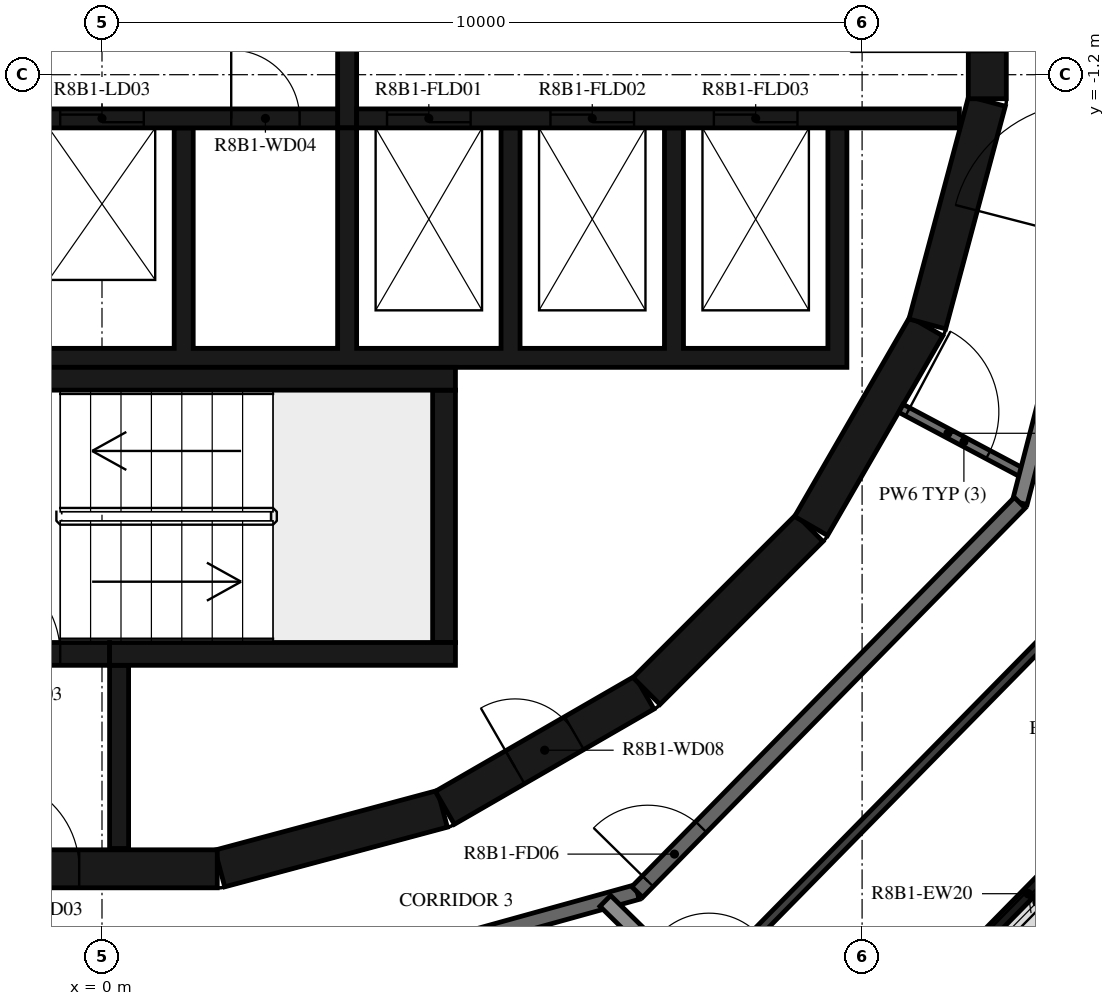
"""IFC4 building model, lengths in metres.
Left out: names, types, materials, properties, quantities, classifications, styles, units other than length and angle.
Written with IfcOpenShell. Run it as: python <this file> out.ifc"""

import sys

from ifc_helpers import new_model, si_unit, direction, frame, frame_2d, origin, place, context, subcontext, project, spatial, polyline, rectangle, outline, extrude, element, fill, save


model = new_model("IFC4")
c1 = context("Model", 3, precision=1e-05, world=origin(), true_north=direction((0.0, 1.0)))
c2 = subcontext(c1, "Body", "Model", "MODEL_VIEW")
j1 = project(units=[si_unit("LENGTHUNIT", "METRE"), si_unit("PLANEANGLEUNIT", "RADIAN")], contexts=[c1])
p1 = place(None, origin())
s1 = spatial("IfcSite", under=j1, at=p1, CompositionType="ELEMENT")
p2 = place(p1, origin())
s2 = spatial("IfcBuilding", under=s1, at=p2, CompositionType="ELEMENT")
p3 = place(p2, frame((0.0, 0.0, 308.7)))
s3 = spatial("IfcBuildingStorey", under=s2, at=p3, CompositionType="ELEMENT", Elevation=308.7)
p4 = place(p3, frame((11.064, -13.116, 0.0), z_axis=(0.0, 0.0, 1.0), x_axis=(0.700900076932, 0.713259477439, 0.0)))
e1 = element("IfcWall", 1, at=p4, inside=s3, PredefinedType="STANDARD", context=c2, shape_type="SweptSolid", body=[
    extrude(rectangle(XDim=3.2, YDim=0.16, at=frame_2d((1.6, 0.0))), origin(), (0.0, 0.0, 1.0), 3.12),
])
p5 = place(p4, frame((0.4, 0.0, 0.0)))
e2 = element("IfcOpeningElement", 2, at=p5, cuts=e1, PredefinedType="OPENING", context=c2, shape_type="SweptSolid", body=[
    extrude(rectangle(XDim=2.4, YDim=2.4, at=frame_2d((1.2, 1.2))), frame((0.0, 0.09, 0.0), z_axis=(0.0, -1.0, 0.0), x_axis=(1.0, 0.0, 0.0)), (0.0, 0.0, 1.0), 0.18),
])
p6 = place(p3, frame((1.55, -11.643, 0.0), z_axis=(0.0, 0.0, 1.0), x_axis=(0.965948410781, 0.258734743916, 0.0)))
e3 = element("IfcWall", 3, at=p6, inside=s3, PredefinedType="SHEAR", context=c2, shape_type="SweptSolid", body=[
    extrude(rectangle(XDim=3.033, YDim=0.5, at=frame_2d((1.516, 0.0))), origin(), (0.0, 0.0, 1.0), 3.12),
])
p7 = place(p3, frame((4.51, -10.845, 0.0), z_axis=(0.0, 0.0, 1.0), x_axis=(0.865975092491, 0.500087131594, 0.0)))
e4 = element("IfcWall", 4, at=p7, inside=s3, PredefinedType="SHEAR", context=c2, shape_type="SweptSolid", body=[
    extrude(rectangle(XDim=3.033, YDim=0.5, at=frame_2d((1.516, 0.0))), origin(), (0.0, 0.0, 1.0), 3.12),
])
p8 = place(p7, frame((1.066, 0.0, 0.0)))
e5 = element("IfcOpeningElement", 5, at=p8, cuts=e4, PredefinedType="OPENING", context=c2, shape_type="SweptSolid", body=[
    extrude(rectangle(XDim=0.9, YDim=2.1, at=frame_2d((0.45, 1.05))), frame((0.0, 0.26, 0.0), z_axis=(0.0, -1.0, 0.0), x_axis=(1.0, 0.0, 0.0)), (0.0, 0.0, 1.0), 0.52),
])
p9 = place(p3, frame((7.164, -9.308, 0.0), z_axis=(0.0, 0.0, 1.0), x_axis=(0.707106781187, 0.707106781187, 0.0)))
e6 = element("IfcWall", 6, at=p9, inside=s3, PredefinedType="SHEAR", context=c2, shape_type="SweptSolid", body=[
    extrude(rectangle(XDim=3.032, YDim=0.5, at=frame_2d((1.516, 0.0))), origin(), (0.0, 0.0, 1.0), 3.12),
])
for number, where, z_axis, x_axis in (
    (7, (9.329, -7.137, 0.0), (0.0, 0.0, 1.0), (0.5, 0.866, 0.0)),
    (8, (10.858, -4.479, 0.0), (0.0, 0.0, 1.0), (0.259, 0.966, 0.0)),
):
    element("IfcWall", number, at=place(p3, frame(where, z_axis=z_axis, x_axis=x_axis)), inside=s3, PredefinedType="SHEAR", context=c2, shape_type="SweptSolid", body=[
        extrude(rectangle(XDim=3.033, YDim=0.5, at=frame_2d((1.516, 0.0))), origin(), (0.0, 0.0, 1.0), 3.12),
    ])
p10 = place(p3, frame((11.647, -1.516, 0.0), z_axis=(0.0, 0.0, 1.0), x_axis=(0.0, 1.0, 0.0)))
e9 = element("IfcWall", 9, at=p10, inside=s3, PredefinedType="SHEAR", context=c2, shape_type="SweptSolid", body=[
    extrude(rectangle(XDim=3.033, YDim=0.5, at=frame_2d((1.516, 0.0))), origin(), (0.0, 0.0, 1.0), 3.12),
])
p11 = place(p10, frame((0.616, 0.0, 0.0)))
e10 = element("IfcOpeningElement", 10, at=p11, cuts=e9, PredefinedType="OPENING", context=c2, shape_type="SweptSolid", body=[
    extrude(rectangle(XDim=1.8, YDim=2.1, at=frame_2d((0.9, 1.05))), frame((0.0, 0.26, 0.0), z_axis=(0.0, -1.0, 0.0), x_axis=(1.0, 0.0, 0.0)), (0.0, 0.0, 1.0), 0.52),
])
p12 = place(p3, frame((-1.516, -11.647, 0.0), z_axis=(0.0, 0.0, 1.0), x_axis=(1.0, 0.0, 0.0)))
e11 = element("IfcWall", 11, at=p12, inside=s3, PredefinedType="SHEAR", context=c2, shape_type="SweptSolid", body=[
    extrude(rectangle(XDim=3.033, YDim=0.5, at=frame_2d((1.516, 0.0))), origin(), (0.0, 0.0, 1.0), 3.12),
])
p13 = place(p12, frame((0.016, 0.0, 0.0)))
e12 = element("IfcOpeningElement", 12, at=p13, cuts=e11, PredefinedType="OPENING", context=c2, shape_type="SweptSolid", body=[
    extrude(rectangle(XDim=1.2, YDim=2.1, at=frame_2d((0.6, 1.05))), frame((0.0, 0.26, 0.0), z_axis=(0.0, -1.0, 0.0), x_axis=(1.0, 0.0, 0.0)), (0.0, 0.0, 1.0), 0.52),
])
p14 = place(p3, frame((-2.4, -5.2, 0.0), z_axis=(0.0, 0.0, 1.0), x_axis=(1.0, 0.0, 0.0)))
e13 = element("IfcWall", 13, at=p14, inside=s3, PredefinedType="SHEAR", context=c2, shape_type="SweptSolid", body=[
    extrude(rectangle(XDim=7.05, YDim=0.3, at=frame_2d((3.525, 0.0))), origin(), (0.0, 0.0, 1.0), 3.12),
])
p15 = place(p3, frame((4.5, -8.67, 0.0), z_axis=(0.0, 0.0, 1.0), x_axis=(0.0, 1.0, 0.0)))
e14 = element("IfcWall", 14, at=p15, inside=s3, PredefinedType="SHEAR", context=c2, shape_type="SweptSolid", body=[
    extrude(rectangle(XDim=3.32, YDim=0.3, at=frame_2d((1.66, 0.0))), origin(), (0.0, 0.0, 1.0), 3.12),
])
p16 = place(p3, frame((0.1, -8.82, 0.0), z_axis=(0.0, 0.0, 1.0), x_axis=(1.0, 0.0, 0.0)))
e15 = element("IfcWall", 15, at=p16, inside=s3, PredefinedType="SHEAR", context=c2, shape_type="SweptSolid", body=[
    extrude(rectangle(XDim=4.55, YDim=0.3, at=frame_2d((2.275, 0.0))), origin(), (0.0, 0.0, 1.0), 3.12),
])
p17 = place(p3, frame((-2.4, -8.82, 0.0), z_axis=(0.0, 0.0, 1.0), x_axis=(1.0, 0.0, 0.0)))
e16 = element("IfcWall", 16, at=p17, inside=s3, PredefinedType="SHEAR", context=c2, shape_type="SweptSolid", body=[
    extrude(rectangle(XDim=2.5, YDim=0.3, at=frame_2d((1.25, 0.0))), origin(), (0.0, 0.0, 1.0), 3.12),
])
p18 = place(p17, frame((0.65, 0.0, 0.0)))
e17 = element("IfcOpeningElement", 17, at=p18, cuts=e16, PredefinedType="OPENING", context=c2, shape_type="SweptSolid", body=[
    extrude(rectangle(XDim=1.2, YDim=2.1, at=frame_2d((0.6, 1.05))), frame((0.0, 0.16, 0.0), z_axis=(0.0, -1.0, 0.0), x_axis=(1.0, 0.0, 0.0)), (0.0, 0.0, 1.0), 0.32),
])
p19 = place(p3, frame((0.225, -8.97, 0.0), z_axis=(0.0, 0.0, 1.0), x_axis=(0.0, -1.0, 0.0)))
e18 = element("IfcWall", 18, at=p19, inside=s3, PredefinedType="SHEAR", context=c2, shape_type="SweptSolid", body=[
    extrude(rectangle(XDim=2.41, YDim=0.25, at=frame_2d((1.205, 0.0))), origin(), (0.0, 0.0, 1.0), 3.12),
])
p20 = place(p3, origin())
e19 = element("IfcWall", 19, at=p20, inside=s3, PredefinedType="SHEAR", context=c2, shape_type="SweptSolid", body=[
    extrude(outline(polyline([(9.8, -5.05), (9.8, -4.8), (9.8, -1.9), (9.55, -1.9), (9.55, -4.8), (7.65, -4.8), (7.65, -1.9), (7.4, -1.9), (7.4, -4.8), (5.5, -4.8), (5.5, -1.9), (5.25, -1.9), (5.25, -4.8), (3.35, -4.8), (3.35, -1.9), (3.1, -1.9), (3.1, -4.8), (1.2, -4.8), (1.2, -1.9), (0.95, -1.9), (0.95, -4.8), (-0.95, -4.8), (-0.95, -1.9), (-1.2, -1.9), (-1.2, -4.8), (-3.1, -4.8), (-3.1, -1.9), (-3.35, -1.9), (-3.35, -4.8), (-5.25, -4.8), (-5.25, -1.9), (-5.5, -1.9), (-5.5, -4.8), (-9.55, -4.8), (-9.55, -1.9), (-9.8, -1.9), (-9.8, -4.8), (-9.8, -5.05), (9.8, -5.05)])), origin(), (0.0, 0.0, 1.0), 3.12),
])
p21 = place(p3, frame((-11.28, -1.775, 0.0), z_axis=(0.0, 0.0, 1.0), x_axis=(1.0, 0.0, 0.0)))
e20 = element("IfcWall", 20, at=p21, inside=s3, PredefinedType="SHEAR", context=c2, shape_type="SweptSolid", body=[
    extrude(rectangle(XDim=14.38, YDim=0.25, at=frame_2d((7.19, 0.0))), origin(), (0.0, 0.0, 1.0), 3.12),
])
p22 = place(p21, frame((6.43, 0.0, 0.0)))
e21 = element("IfcOpeningElement", 21, at=p22, cuts=e20, PredefinedType="OPENING", context=c2, shape_type="SweptSolid", body=[
    extrude(rectangle(XDim=1.1, YDim=2.1, at=frame_2d((0.55, 1.05))), frame((0.0, 0.135, 0.0), z_axis=(0.0, -1.0, 0.0), x_axis=(1.0, 0.0, 0.0)), (0.0, 0.0, 1.0), 0.27),
])
p23 = place(p21, frame((8.58, 0.0, 0.0)))
e22 = element("IfcOpeningElement", 22, at=p23, cuts=e20, PredefinedType="OPENING", context=c2, shape_type="SweptSolid", body=[
    extrude(rectangle(XDim=1.1, YDim=2.1, at=frame_2d((0.55, 1.05))), frame((0.0, 0.135, 0.0), z_axis=(0.0, -1.0, 0.0), x_axis=(1.0, 0.0, 0.0)), (0.0, 0.0, 1.0), 0.27),
])
p24 = place(p21, frame((10.73, 0.0, 0.0)))
e23 = element("IfcOpeningElement", 23, at=p24, cuts=e20, PredefinedType="OPENING", context=c2, shape_type="SweptSolid", body=[
    extrude(rectangle(XDim=1.1, YDim=2.1, at=frame_2d((0.55, 1.05))), frame((0.0, 0.135, 0.0), z_axis=(0.0, -1.0, 0.0), x_axis=(1.0, 0.0, 0.0)), (0.0, 0.0, 1.0), 0.27),
])
p25 = place(p21, frame((3.305, 0.0, 0.0)))
e24 = element("IfcOpeningElement", 24, at=p25, cuts=e20, PredefinedType="OPENING", context=c2, shape_type="SweptSolid", body=[
    extrude(rectangle(XDim=0.9, YDim=2.1, at=frame_2d((0.45, 1.05))), frame((0.0, 0.135, 0.0), z_axis=(0.0, -1.0, 0.0), x_axis=(1.0, 0.0, 0.0)), (0.0, 0.0, 1.0), 0.27),
])
p26 = place(p21, frame((12.98, 0.0, 0.0)))
e25 = element("IfcOpeningElement", 25, at=p26, cuts=e20, PredefinedType="OPENING", context=c2, shape_type="SweptSolid", body=[
    extrude(rectangle(XDim=0.9, YDim=2.1, at=frame_2d((0.45, 1.05))), frame((0.0, 0.135, 0.0), z_axis=(0.0, -1.0, 0.0), x_axis=(1.0, 0.0, 0.0)), (0.0, 0.0, 1.0), 0.27),
])
p27 = place(p3, frame((3.35, -1.775, 0.0), z_axis=(0.0, 0.0, 1.0), x_axis=(1.0, 0.0, 0.0)))
e26 = element("IfcWall", 26, at=p27, inside=s3, PredefinedType="SHEAR", context=c2, shape_type="SweptSolid", body=[
    extrude(rectangle(XDim=7.93, YDim=0.25, at=frame_2d((3.965, 0.0))), origin(), (0.0, 0.0, 1.0), 3.12),
])
p28 = place(p27, frame((0.4, 0.0, 0.0)))
e27 = element("IfcOpeningElement", 27, at=p28, cuts=e26, PredefinedType="OPENING", context=c2, shape_type="SweptSolid", body=[
    extrude(rectangle(XDim=1.1, YDim=2.4, at=frame_2d((0.55, 1.2))), frame((0.0, 0.135, 0.0), z_axis=(0.0, -1.0, 0.0), x_axis=(1.0, 0.0, 0.0)), (0.0, 0.0, 1.0), 0.27),
])
p29 = place(p27, frame((2.55, 0.0, 0.0)))
e28 = element("IfcOpeningElement", 28, at=p29, cuts=e26, PredefinedType="OPENING", context=c2, shape_type="SweptSolid", body=[
    extrude(rectangle(XDim=1.1, YDim=2.4, at=frame_2d((0.55, 1.2))), frame((0.0, 0.135, 0.0), z_axis=(0.0, -1.0, 0.0), x_axis=(1.0, 0.0, 0.0)), (0.0, 0.0, 1.0), 0.27),
])
p30 = place(p27, frame((4.7, 0.0, 0.0)))
e29 = element("IfcOpeningElement", 29, at=p30, cuts=e26, PredefinedType="OPENING", context=c2, shape_type="SweptSolid", body=[
    extrude(rectangle(XDim=1.1, YDim=2.4, at=frame_2d((0.55, 1.2))), frame((0.0, 0.135, 0.0), z_axis=(0.0, -1.0, 0.0), x_axis=(1.0, 0.0, 0.0)), (0.0, 0.0, 1.0), 0.27),
])
p31 = place(p3, frame((3.225, -1.9, 0.0), z_axis=(0.0, 0.0, 1.0), x_axis=(0.0, 1.0, 0.0)))
e30 = element("IfcWall", 30, at=p31, inside=s3, PredefinedType="SHEAR", context=c2, shape_type="SweptSolid", body=[
    extrude(rectangle(XDim=3.8, YDim=0.25, at=frame_2d((1.9, 0.0))), origin(), (0.0, 0.0, 1.0), 3.12),
])
p32 = place(p3, frame((10.511, -5.589, 0.0), z_axis=(0.0, 0.0, 1.0), x_axis=(0.882957311919, -0.469453283437, 0.0)))
e31 = element("IfcWall", 31, at=p32, inside=s3, PredefinedType="PARTITIONING", context=c2, shape_type="SweptSolid", body=[
    extrude(rectangle(XDim=1.876, YDim=0.12, at=frame_2d((0.938, 0.0))), origin(), (0.0, 0.0, 1.0), 3.12),
])
p33 = place(p32, frame((0.1, 0.0, 0.0)))
e32 = element("IfcOpeningElement", 32, at=p33, cuts=e31, PredefinedType="OPENING", context=c2, shape_type="SweptSolid", body=[
    extrude(rectangle(XDim=1.2, YDim=2.1, at=frame_2d((0.6, 1.05))), frame((0.0, 0.07, 0.0), z_axis=(0.0, -1.0, 0.0), x_axis=(1.0, 0.0, 0.0)), (0.0, 0.0, 1.0), 0.14),
])
p34 = place(p3, frame((12.074, -6.831, 0.0), z_axis=(0.0, 0.0, 1.0), x_axis=(0.250391063186, 0.968144780225, 0.0)))
e33 = element("IfcWall", 33, at=p34, inside=s3, PredefinedType="STANDARD", context=c2, shape_type="SweptSolid", body=[
    extrude(rectangle(XDim=7.181, YDim=0.2, at=frame_2d((3.591, 0.0))), origin(), (0.0, 0.0, 1.0), 3.12),
])
p35 = place(p34, frame((3.581, 0.0, 0.0)))
e34 = element("IfcOpeningElement", 34, at=p35, cuts=e33, PredefinedType="OPENING", context=c2, shape_type="SweptSolid", body=[
    extrude(rectangle(XDim=1.8, YDim=2.1, at=frame_2d((0.9, 1.05))), frame((0.0, 0.11, 0.0), z_axis=(0.0, -1.0, 0.0), x_axis=(1.0, 0.0, 0.0)), (0.0, 0.0, 1.0), 0.22),
])
p36 = place(p3, frame((-6.831, -12.074, 0.0), z_axis=(0.0, 0.0, 1.0), x_axis=(0.968144780225, -0.250391063186, 0.0)))
e35 = element("IfcWall", 35, at=p36, inside=s3, PredefinedType="STANDARD", context=c2, shape_type="SweptSolid", body=[
    extrude(rectangle(XDim=7.181, YDim=0.2, at=frame_2d((3.591, 0.0))), origin(), (0.0, 0.0, 1.0), 3.12),
])
p37 = place(p36, frame((2.39, 0.0, 0.0)))
e36 = element("IfcOpeningElement", 36, at=p37, cuts=e35, PredefinedType="OPENING", context=c2, shape_type="SweptSolid", body=[
    extrude(rectangle(XDim=1.0, YDim=2.1, at=frame_2d((0.5, 1.05))), frame((0.0, 0.11, 0.0), z_axis=(0.0, -1.0, 0.0), x_axis=(1.0, 0.0, 0.0)), (0.0, 0.0, 1.0), 0.22),
])
p38 = place(p36, frame((5.69, 0.0, 0.0)))
e37 = element("IfcOpeningElement", 37, at=p38, cuts=e35, PredefinedType="OPENING", context=c2, shape_type="SweptSolid", body=[
    extrude(rectangle(XDim=1.0, YDim=2.1, at=frame_2d((0.5, 1.05))), frame((0.0, 0.11, 0.0), z_axis=(0.0, -1.0, 0.0), x_axis=(1.0, 0.0, 0.0)), (0.0, 0.0, 1.0), 0.22),
])
p39 = place(p3, frame((0.121, -13.872, 0.0), z_axis=(0.0, 0.0, 1.0), x_axis=(0.963625960674, 0.267254575108, 0.0)))
e38 = element("IfcWall", 38, at=p39, inside=s3, PredefinedType="STANDARD", context=c2, shape_type="SweptSolid", body=[
    extrude(rectangle(XDim=7.181, YDim=0.2, at=frame_2d((3.591, 0.0))), origin(), (0.0, 0.0, 1.0), 3.12),
])
p40 = place(p3, frame((7.041, -11.953, 0.0), z_axis=(0.0, 0.0, 1.0), x_axis=(0.70090916255, 0.713250549143, 0.0)))
e39 = element("IfcWall", 39, at=p40, inside=s3, PredefinedType="STANDARD", context=c2, shape_type="SweptSolid", body=[
    extrude(rectangle(XDim=7.181, YDim=0.2, at=frame_2d((3.59, 0.0))), origin(), (0.0, 0.0, 1.0), 3.12),
])
p41 = place(p40, frame((0.2, 0.0, 0.0)))
e40 = element("IfcOpeningElement", 40, at=p41, cuts=e39, PredefinedType="OPENING", context=c2, shape_type="SweptSolid", body=[
    extrude(rectangle(XDim=1.0, YDim=2.1, at=frame_2d((0.5, 1.05))), frame((0.0, 0.11, 0.0), z_axis=(0.0, -1.0, 0.0), x_axis=(1.0, 0.0, 0.0)), (0.0, 0.0, 1.0), 0.22),
])
p42 = place(p3, frame((9.462, -14.861, 0.0), z_axis=(0.0, 0.0, 1.0), x_axis=(-0.713302018318, 0.700856783276, 0.0)))
e41 = element("IfcWall", 41, at=p42, inside=s3, PredefinedType="STANDARD", context=c2, shape_type="SweptSolid", body=[
    extrude(rectangle(XDim=3.982, YDim=0.2, at=frame_2d((1.991, 0.0))), origin(), (0.0, 0.0, 1.0), 2.73),
])
p43 = place(p3, frame((7.846, -13.273, 0.0), z_axis=(0.0, 0.0, 1.0), x_axis=(0.700915117659, 0.713244697027, 0.0)))
e42 = element("IfcWall", 42, at=p43, inside=s3, PredefinedType="PARTITIONING", context=c2, shape_type="SweptSolid", body=[
    extrude(rectangle(XDim=7.96, YDim=0.12, at=frame_2d((3.98, 0.0))), origin(), (0.0, 0.0, 1.0), 3.12),
])
p44 = place(p43, frame((0.2, 0.0, 0.0)))
e43 = element("IfcOpeningElement", 43, at=p44, cuts=e42, PredefinedType="OPENING", context=c2, shape_type="SweptSolid", body=[
    extrude(rectangle(XDim=0.9, YDim=2.1, at=frame_2d((0.45, 1.05))), frame((0.0, 0.07, 0.0), z_axis=(0.0, -1.0, 0.0), x_axis=(1.0, 0.0, 0.0)), (0.0, 0.0, 1.0), 0.14),
])
p45 = place(p5, origin())
e44 = element("IfcDoor", 44, at=p45, inside=s3, OperationType="DOUBLE_DOOR_SLIDING", PredefinedType="DOOR", context=c2, shape_type="SweptSolid", body=[
    extrude(rectangle(XDim=2.4, YDim=2.4, at=frame_2d((1.2, 1.2))), frame((0.0, 0.025, 0.0), z_axis=(0.0, -1.0, 0.0), x_axis=(1.0, 0.0, 0.0)), (0.0, 0.0, 1.0), 0.05),
])
fill(e2, e44)
p46 = place(p18, origin())
e45 = element("IfcDoor", 45, at=p46, inside=s3, OperationType="SINGLE_SWING_LEFT", PredefinedType="DOOR", context=c2, shape_type="SweptSolid", body=[
    extrude(rectangle(XDim=1.2, YDim=2.1, at=frame_2d((0.6, 1.05))), frame((0.0, 0.025, 0.0), z_axis=(0.0, -1.0, 0.0), x_axis=(1.0, 0.0, 0.0)), (0.0, 0.0, 1.0), 0.05),
])
fill(e17, e45)
p47 = place(p13, origin())
e46 = element("IfcDoor", 46, at=p47, inside=s3, OperationType="SINGLE_SWING_RIGHT", PredefinedType="DOOR", context=c2, shape_type="SweptSolid", body=[
    extrude(rectangle(XDim=1.2, YDim=2.1, at=frame_2d((0.6, 1.05))), frame((0.0, 0.025, 0.0), z_axis=(0.0, -1.0, 0.0), x_axis=(1.0, 0.0, 0.0)), (0.0, 0.0, 1.0), 0.05),
])
fill(e12, e46)
p48 = place(p11, origin())
e47 = element("IfcDoor", 47, at=p48, inside=s3, OperationType="DOUBLE_DOOR_SINGLE_SWING", PredefinedType="DOOR", context=c2, shape_type="SweptSolid", body=[
    extrude(rectangle(XDim=1.8, YDim=2.1, at=frame_2d((0.9, 1.05))), frame((0.0, 0.025, 0.0), z_axis=(0.0, -1.0, 0.0), x_axis=(1.0, 0.0, 0.0)), (0.0, 0.0, 1.0), 0.05),
])
fill(e10, e47)
p49 = place(p24, origin())
e48 = element("IfcDoor", 48, at=p49, inside=s3, OperationType="DOUBLE_DOOR_SLIDING", PredefinedType="DOOR", context=c2, shape_type="SweptSolid", body=[
    extrude(rectangle(XDim=1.1, YDim=2.1, at=frame_2d((0.55, 1.05))), frame((0.0, 0.025, 0.0), z_axis=(0.0, -1.0, 0.0), x_axis=(1.0, 0.0, 0.0)), (0.0, 0.0, 1.0), 0.05),
])
fill(e23, e48)
p50 = place(p28, origin())
e49 = element("IfcDoor", 49, at=p50, inside=s3, OperationType="DOUBLE_DOOR_SLIDING", PredefinedType="DOOR", context=c2, shape_type="SweptSolid", body=[
    extrude(rectangle(XDim=1.1, YDim=2.4, at=frame_2d((0.55, 1.2))), frame((0.0, 0.025, 0.0), z_axis=(0.0, -1.0, 0.0), x_axis=(1.0, 0.0, 0.0)), (0.0, 0.0, 1.0), 0.05),
])
fill(e27, e49)
p51 = place(p29, origin())
e50 = element("IfcDoor", 50, at=p51, inside=s3, OperationType="DOUBLE_DOOR_SLIDING", PredefinedType="DOOR", context=c2, shape_type="SweptSolid", body=[
    extrude(rectangle(XDim=1.1, YDim=2.4, at=frame_2d((0.55, 1.2))), frame((0.0, 0.025, 0.0), z_axis=(0.0, -1.0, 0.0), x_axis=(1.0, 0.0, 0.0)), (0.0, 0.0, 1.0), 0.05),
])
fill(e28, e50)
p52 = place(p30, origin())
e51 = element("IfcDoor", 51, at=p52, inside=s3, OperationType="DOUBLE_DOOR_SLIDING", PredefinedType="DOOR", context=c2, shape_type="SweptSolid", body=[
    extrude(rectangle(XDim=1.1, YDim=2.4, at=frame_2d((0.55, 1.2))), frame((0.0, 0.025, 0.0), z_axis=(0.0, -1.0, 0.0), x_axis=(1.0, 0.0, 0.0)), (0.0, 0.0, 1.0), 0.05),
])
fill(e29, e51)
p53 = place(p26, origin())
e52 = element("IfcDoor", 52, at=p53, inside=s3, OperationType="SINGLE_SWING_RIGHT", PredefinedType="DOOR", context=c2, shape_type="SweptSolid", body=[
    extrude(rectangle(XDim=0.9, YDim=2.1, at=frame_2d((0.45, 1.05))), frame((0.0, 0.025, 0.0), z_axis=(0.0, -1.0, 0.0), x_axis=(1.0, 0.0, 0.0)), (0.0, 0.0, 1.0), 0.05),
])
fill(e25, e52)
p54 = place(p8, origin())
e53 = element("IfcDoor", 53, at=p54, inside=s3, OperationType="SINGLE_SWING_RIGHT", PredefinedType="DOOR", context=c2, shape_type="SweptSolid", body=[
    extrude(rectangle(XDim=0.9, YDim=2.1, at=frame_2d((0.45, 1.05))), frame((0.0, 0.025, 0.0), z_axis=(0.0, -1.0, 0.0), x_axis=(1.0, 0.0, 0.0)), (0.0, 0.0, 1.0), 0.05),
])
fill(e5, e53)
p55 = place(p41, origin())
e54 = element("IfcDoor", 54, at=p55, inside=s3, OperationType="SINGLE_SWING_LEFT", PredefinedType="DOOR", context=c2, shape_type="SweptSolid", body=[
    extrude(rectangle(XDim=1.0, YDim=2.1, at=frame_2d((0.5, 1.05))), frame((0.0, 0.025, 0.0), z_axis=(0.0, -1.0, 0.0), x_axis=(1.0, 0.0, 0.0)), (0.0, 0.0, 1.0), 0.05),
])
fill(e40, e54)
p56 = place(p33, origin())
e55 = element("IfcDoor", 55, at=p56, inside=s3, OperationType="DOUBLE_DOOR_SINGLE_SWING", PredefinedType="DOOR", context=c2, shape_type="SweptSolid", body=[
    extrude(rectangle(XDim=1.2, YDim=2.1, at=frame_2d((0.6, 1.05))), frame((0.0, 0.025, 0.0), z_axis=(0.0, -1.0, 0.0), x_axis=(1.0, 0.0, 0.0)), (0.0, 0.0, 1.0), 0.05),
])
fill(e32, e55)
save(model, sys.argv[1])
